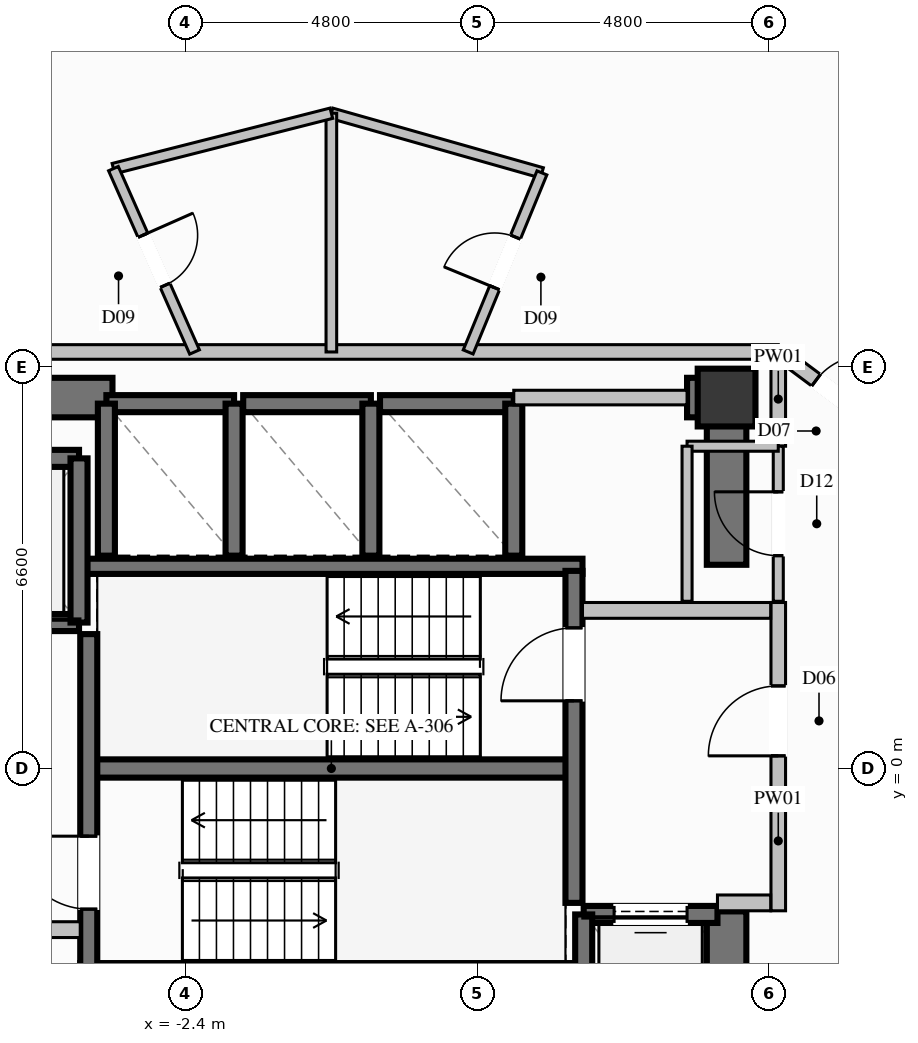
"""IFC4 building model, lengths in metres.
Left out: names, types, materials, properties, quantities, classifications, styles, units other than length and angle.
Written with IfcOpenShell. Run it as: python <this file> out.ifc"""

import sys

from ifc_helpers import new_model, si_unit, direction, frame, frame_2d, origin, origin_2d, place, context, subcontext, project, spatial, rectangle, extrude, element, fill, save


model = new_model("IFC4")
c1 = context("Model", 3, precision=1e-05, world=origin(), true_north=direction((0.0, 1.0)))
c2 = subcontext(c1, "Body", "Model", "MODEL_VIEW")
j1 = project(units=[si_unit("LENGTHUNIT", "METRE"), si_unit("PLANEANGLEUNIT", "RADIAN")], contexts=[c1])
p1 = place(None, origin())
s1 = spatial("IfcSite", under=j1, at=p1, CompositionType="ELEMENT")
p2 = place(p1, origin())
s2 = spatial("IfcBuilding", under=s1, at=p2, CompositionType="ELEMENT")
p3 = place(p2, frame((0.0, 0.0, 106.2)))
s3 = spatial("IfcBuildingStorey", under=s2, at=p3, CompositionType="ELEMENT", Elevation=106.2)
p4 = place(p3, frame((6.5, 6.1, 0.0), z_axis=(0.0, 0.0, 1.0), x_axis=(1.0, 0.0, 0.0)))
e1 = element("IfcColumn", 1, at=p4, inside=s3, PredefinedType="COLUMN", context=c2, shape_type="SweptSolid", body=[
    extrude(rectangle(XDim=0.95, YDim=0.95, at=origin_2d()), origin(), (0.0, 0.0, 1.0), 3.6),
])
p5 = place(p3, frame((-3.99, 0.0, 0.0), z_axis=(0.0, 0.0, 1.0), x_axis=(1.0, 0.0, 0.0)))
e2 = element("IfcWall", 2, at=p5, inside=s3, PredefinedType="SHEAR", context=c2, shape_type="SweptSolid", body=[
    extrude(rectangle(XDim=7.98, YDim=0.3, at=frame_2d((3.99, 0.0))), origin(), (0.0, 0.0, 1.0), 3.6),
])
for number, where, z_axis, x_axis in (
    (3, (-4.13, -3.325, 0.0), (0.0, 0.0, 1.0), (1.0, 0.0, 0.0)),
    (4, (-4.13, 3.325, 0.0), (0.0, 0.0, 1.0), (1.0, 0.0, 0.0)),
):
    element("IfcWall", number, at=place(p3, frame(where, z_axis=z_axis, x_axis=x_axis)), inside=s3, PredefinedType="SOLIDWALL", context=c2, shape_type="SweptSolid", body=[
        extrude(rectangle(XDim=8.26, YDim=0.25, at=frame_2d((4.13, 0.0))), origin(), (0.0, 0.0, 1.0), 3.6),
    ])
p6 = place(p3, frame((-6.175, 6.1, 0.0), z_axis=(0.0, 0.0, 1.0), x_axis=(1.0, 0.0, 0.0)))
e5 = element("IfcWall", 5, at=p6, inside=s3, PredefinedType="SHEAR", context=c2, shape_type="SweptSolid", body=[
    extrude(rectangle(XDim=2.575, YDim=0.65, at=frame_2d((1.288, 0.0))), origin(), (0.0, 0.0, 1.0), 3.6),
])
p7 = place(p3, frame((5.85, 6.1, 0.0), z_axis=(0.0, 0.0, 1.0), x_axis=(1.0, 0.0, 0.0)))
e6 = element("IfcWall", 6, at=p7, inside=s3, PredefinedType="SHEAR", context=c2, shape_type="SweptSolid", body=[
    extrude(rectangle(XDim=0.325, YDim=0.65, at=frame_2d((0.163, 0.0))), origin(), (0.0, 0.0, 1.0), 3.6),
])
p8 = place(p3, frame((6.5, -6.425, 0.0), z_axis=(0.0, 0.0, 1.0), x_axis=(0.0, 1.0, 0.0)))
e7 = element("IfcWall", 7, at=p8, inside=s3, PredefinedType="SHEAR", context=c2, shape_type="SweptSolid", body=[
    extrude(rectangle(XDim=4.075, YDim=0.65, at=frame_2d((2.038, 0.0))), origin(), (0.0, 0.0, 1.0), 3.6),
])
p9 = place(p3, frame((6.5, 3.35, 0.0), z_axis=(0.0, 0.0, 1.0), x_axis=(0.0, 1.0, 0.0)))
e8 = element("IfcWall", 8, at=p9, inside=s3, PredefinedType="SHEAR", context=c2, shape_type="SweptSolid", body=[
    extrude(rectangle(XDim=3.075, YDim=0.65, at=frame_2d((1.538, 0.0))), origin(), (0.0, 0.0, 1.0), 3.6),
])
p10 = place(p3, frame((-1.6, 6.0, 0.0), z_axis=(0.0, 0.0, 1.0), x_axis=(-1.0, 0.0, 0.0)))
e9 = element("IfcWall", 9, at=p10, inside=s3, PredefinedType="SOLIDWALL", context=c2, shape_type="SweptSolid", body=[
    extrude(rectangle(XDim=2.1, YDim=0.28, at=frame_2d((1.05, 0.0))), origin(), (0.0, 0.0, 1.0), 3.35),
])
for number, where, z_axis, x_axis in (
    (10, (-3.7, 6.0, 0.0), (0.0, 0.0, 1.0), (0.0, -1.0, 0.0)),
    (11, (-1.6, 3.5, 0.0), (0.0, 0.0, 1.0), (0.0, 1.0, 0.0)),
):
    element("IfcWall", number, at=place(p3, frame(where, z_axis=z_axis, x_axis=x_axis)), inside=s3, PredefinedType="SOLIDWALL", context=c2, shape_type="SweptSolid", body=[
        extrude(rectangle(XDim=2.5, YDim=0.28, at=frame_2d((1.25, 0.0))), origin(), (0.0, 0.0, 1.0), 3.35),
    ])
p11 = place(p3, frame((0.65, 6.0, 0.0), z_axis=(0.0, 0.0, 1.0), x_axis=(-1.0, 0.0, 0.0)))
e12 = element("IfcWall", 12, at=p11, inside=s3, PredefinedType="SOLIDWALL", context=c2, shape_type="SweptSolid", body=[
    extrude(rectangle(XDim=2.1, YDim=0.28, at=frame_2d((1.05, 0.0))), origin(), (0.0, 0.0, 1.0), 3.35),
])
p12 = place(p3, frame((0.65, 3.5, 0.0), z_axis=(0.0, 0.0, 1.0), x_axis=(0.0, 1.0, 0.0)))
e13 = element("IfcWall", 13, at=p12, inside=s3, PredefinedType="SOLIDWALL", context=c2, shape_type="SweptSolid", body=[
    extrude(rectangle(XDim=2.5, YDim=0.28, at=frame_2d((1.25, 0.0))), origin(), (0.0, 0.0, 1.0), 3.35),
])
p13 = place(p3, frame((3.0, 6.0, 0.0), z_axis=(0.0, 0.0, 1.0), x_axis=(-1.0, 0.0, 0.0)))
e14 = element("IfcWall", 14, at=p13, inside=s3, PredefinedType="SOLIDWALL", context=c2, shape_type="SweptSolid", body=[
    extrude(rectangle(XDim=2.2, YDim=0.28, at=frame_2d((1.1, 0.0))), origin(), (0.0, 0.0, 1.0), 3.35),
])
p14 = place(p3, frame((3.0, 3.5, 0.0), z_axis=(0.0, 0.0, 1.0), x_axis=(0.0, 1.0, 0.0)))
e15 = element("IfcWall", 15, at=p14, inside=s3, PredefinedType="SOLIDWALL", context=c2, shape_type="SweptSolid", body=[
    extrude(rectangle(XDim=2.5, YDim=0.28, at=frame_2d((1.25, 0.0))), origin(), (0.0, 0.0, 1.0), 3.35),
])
p15 = place(p3, frame((-6.35, 2.4, 0.0), z_axis=(0.0, 0.0, 1.0), x_axis=(1.0, 0.0, 0.0)))
e16 = element("IfcWall", 16, at=p15, inside=s3, PredefinedType="SOLIDWALL", context=c2, shape_type="SweptSolid", body=[
    extrude(rectangle(XDim=2.2, YDim=0.28, at=frame_2d((1.1, 0.0))), origin(), (0.0, 0.0, 1.0), 3.35),
])
p16 = place(p15, frame((0.5, 0.0, 0.0)))
e17 = element("IfcOpeningElement", 17, at=p16, cuts=e16, PredefinedType="OPENING", context=c2, shape_type="SweptSolid", body=[
    extrude(rectangle(XDim=1.2, YDim=2.2, at=frame_2d((0.6, 1.1))), frame((0.0, 0.15, 0.0), z_axis=(0.0, -1.0, 0.0), x_axis=(1.0, 0.0, 0.0)), (0.0, 0.0, 1.0), 0.3),
])
p17 = place(p3, frame((-4.15, 5.1, 0.0), z_axis=(0.0, 0.0, 1.0), x_axis=(-1.0, 0.0, 0.0)))
e18 = element("IfcWall", 18, at=p17, inside=s3, PredefinedType="SOLIDWALL", context=c2, shape_type="SweptSolid", body=[
    extrude(rectangle(XDim=2.2, YDim=0.28, at=frame_2d((1.1, 0.0))), origin(), (0.0, 0.0, 1.0), 3.35),
])
p18 = place(p3, frame((-4.15, 2.4, 0.0), z_axis=(0.0, 0.0, 1.0), x_axis=(0.0, 1.0, 0.0)))
e19 = element("IfcWall", 19, at=p18, inside=s3, PredefinedType="SOLIDWALL", context=c2, shape_type="SweptSolid", body=[
    extrude(rectangle(XDim=2.7, YDim=0.28, at=frame_2d((1.35, 0.0))), origin(), (0.0, 0.0, 1.0), 3.35),
])
p19 = place(p3, frame((6.35, -2.4, 0.0), z_axis=(0.0, 0.0, 1.0), x_axis=(-1.0, 0.0, 0.0)))
e20 = element("IfcWall", 20, at=p19, inside=s3, PredefinedType="SOLIDWALL", context=c2, shape_type="SweptSolid", body=[
    extrude(rectangle(XDim=2.2, YDim=0.28, at=frame_2d((1.1, 0.0))), origin(), (0.0, 0.0, 1.0), 3.35),
])
p20 = place(p19, frame((0.5, 0.0, 0.0)))
e21 = element("IfcOpeningElement", 21, at=p20, cuts=e20, PredefinedType="OPENING", context=c2, shape_type="SweptSolid", body=[
    extrude(rectangle(XDim=1.2, YDim=2.2, at=frame_2d((0.6, 1.1))), frame((0.0, 0.15, 0.0), z_axis=(0.0, -1.0, 0.0), x_axis=(1.0, 0.0, 0.0)), (0.0, 0.0, 1.0), 0.3),
])
p21 = place(p3, frame((4.15, -2.4, 0.0), z_axis=(0.0, 0.0, 1.0), x_axis=(0.0, -1.0, 0.0)))
e22 = element("IfcWall", 22, at=p21, inside=s3, PredefinedType="SOLIDWALL", context=c2, shape_type="SweptSolid", body=[
    extrude(rectangle(XDim=2.7, YDim=0.28, at=frame_2d((1.35, 0.0))), origin(), (0.0, 0.0, 1.0), 3.35),
])
p22 = place(p3, frame((-3.99, -3.25, 0.0), z_axis=(0.0, 0.0, 1.0), x_axis=(0.0, 1.0, 0.0)))
e23 = element("IfcWall", 23, at=p22, inside=s3, PredefinedType="SOLIDWALL", context=c2, shape_type="SweptSolid", body=[
    extrude(rectangle(XDim=5.46, YDim=0.28, at=frame_2d((2.73, 0.0))), origin(), (0.0, 0.0, 1.0), 3.35),
])
p23 = place(p22, frame((0.937, 0.0, 0.0)))
e24 = element("IfcOpeningElement", 24, at=p23, cuts=e23, PredefinedType="OPENING", context=c2, shape_type="SweptSolid", body=[
    extrude(rectangle(XDim=1.2, YDim=2.2, at=frame_2d((0.6, 1.1))), frame((0.0, 0.15, 0.0), z_axis=(0.0, -1.0, 0.0), x_axis=(1.0, 0.0, 0.0)), (0.0, 0.0, 1.0), 0.3),
])
p24 = place(p3, frame((3.99, -2.21, 0.0), z_axis=(0.0, 0.0, 1.0), x_axis=(0.0, 1.0, 0.0)))
e25 = element("IfcWall", 25, at=p24, inside=s3, PredefinedType="SOLIDWALL", context=c2, shape_type="SweptSolid", body=[
    extrude(rectangle(XDim=5.46, YDim=0.28, at=frame_2d((2.73, 0.0))), origin(), (0.0, 0.0, 1.0), 3.35),
])
p25 = place(p24, frame((3.323, 0.0, 0.0)))
e26 = element("IfcOpeningElement", 26, at=p25, cuts=e25, PredefinedType="OPENING", context=c2, shape_type="SweptSolid", body=[
    extrude(rectangle(XDim=1.2, YDim=2.2, at=frame_2d((0.6, 1.1))), frame((0.0, 0.15, 0.0), z_axis=(0.0, -1.0, 0.0), x_axis=(1.0, 0.0, 0.0)), (0.0, 0.0, 1.0), 0.3),
])
p26 = place(p3, frame((-7.225, -2.65, 0.0), z_axis=(0.0, 0.0, 1.0), x_axis=(1.0, 0.0, 0.0)))
e27 = element("IfcWall", 27, at=p26, inside=s3, PredefinedType="PARTITIONING", context=c2, shape_type="SweptSolid", body=[
    extrude(rectangle(XDim=3.095, YDim=0.26, at=frame_2d((1.548, 0.0))), origin(), (0.0, 0.0, 1.0), 3.35),
])
p27 = place(p3, frame((7.35, -2.34, 0.0), z_axis=(0.0, 0.0, 1.0), x_axis=(0.0, 1.0, 0.0)))
e28 = element("IfcWall", 28, at=p27, inside=s3, PredefinedType="PARTITIONING", context=c2, shape_type="SweptSolid", body=[
    extrude(rectangle(XDim=5.07, YDim=0.24, at=frame_2d((2.535, 0.0))), origin(), (0.0, 0.0, 1.0), 2.435),
])
p28 = place(p27, frame((2.548, 0.0, 0.0)))
e29 = element("IfcOpeningElement", 29, at=p28, cuts=e28, PredefinedType="OPENING", context=c2, shape_type="SweptSolid", body=[
    extrude(rectangle(XDim=1.15, YDim=2.2, at=frame_2d((0.575, 1.1))), frame((0.0, 0.13, 0.0), z_axis=(0.0, -1.0, 0.0), x_axis=(1.0, 0.0, 0.0)), (0.0, 0.0, 1.0), 0.26),
])
p29 = place(p3, frame((6.35, -2.21, 0.0), z_axis=(0.0, 0.0, 1.0), x_axis=(1.0, 0.0, 0.0)))
e30 = element("IfcWall", 30, at=p29, inside=s3, PredefinedType="PARTITIONING", context=c2, shape_type="SweptSolid", body=[
    extrude(rectangle(XDim=0.875, YDim=0.26, at=frame_2d((0.438, 0.0))), origin(), (0.0, 0.0, 1.0), 3.35),
])
p30 = place(p3, frame((4.13, 2.6, 0.0), z_axis=(0.0, 0.0, 1.0), x_axis=(1.0, 0.0, 0.0)))
e31 = element("IfcWall", 31, at=p30, inside=s3, PredefinedType="PARTITIONING", context=c2, shape_type="SweptSolid", body=[
    extrude(rectangle(XDim=3.095, YDim=0.26, at=frame_2d((1.548, 0.0))), origin(), (0.0, 0.0, 1.0), 3.35),
])
p31 = place(p3, frame((-7.35, 6.85, 0.0), z_axis=(0.0, 0.0, 1.0), x_axis=(1.0, 0.0, 0.0)))
e32 = element("IfcWall", 32, at=p31, inside=s3, PredefinedType="PARTITIONING", context=c2, shape_type="SweptSolid", body=[
    extrude(rectangle(XDim=14.7, YDim=0.24, at=frame_2d((7.35, 0.0))), origin(), (0.0, 0.0, 1.0), 2.435),
])
p32 = place(p3, frame((7.35, 5.3, 0.0), z_axis=(0.0, 0.0, 1.0), x_axis=(0.0, 1.0, 0.0)))
e33 = element("IfcWall", 33, at=p32, inside=s3, PredefinedType="PARTITIONING", context=c2, shape_type="SweptSolid", body=[
    extrude(rectangle(XDim=1.55, YDim=0.24, at=frame_2d((0.775, 0.0))), origin(), (0.0, 0.0, 1.0), 2.435),
])
p33 = place(p3, frame((3.0, 6.1, 0.0), z_axis=(0.0, 0.0, 1.0), x_axis=(1.0, 0.0, 0.0)))
e34 = element("IfcWall", 34, at=p33, inside=s3, PredefinedType="PARTITIONING", context=c2, shape_type="SweptSolid", body=[
    extrude(rectangle(XDim=2.85, YDim=0.24, at=frame_2d((1.425, 0.0))), origin(), (0.0, 0.0, 1.0), 2.435),
])
p34 = place(p3, frame((7.35, 2.75, 0.0), z_axis=(0.0, 0.0, 1.0), x_axis=(0.0, 1.0, 0.0)))
e35 = element("IfcWall", 35, at=p34, inside=s3, PredefinedType="PARTITIONING", context=c2, shape_type="SweptSolid", body=[
    extrude(rectangle(XDim=2.55, YDim=0.165, at=frame_2d((1.275, 0.0))), origin(), (0.0, 0.0, 1.0), 3.35),
])
p35 = place(p34, frame((0.75, 0.0, 0.0)))
e36 = element("IfcOpeningElement", 36, at=p35, cuts=e35, PredefinedType="OPENING", context=c2, shape_type="SweptSolid", body=[
    extrude(rectangle(XDim=1.05, YDim=2.15, at=frame_2d((0.525, 1.075))), frame((0.0, 0.093, 0.0), z_axis=(0.0, -1.0, 0.0), x_axis=(1.0, 0.0, 0.0)), (0.0, 0.0, 1.0), 0.185),
])
p36 = place(p3, frame((7.35, 5.3, 0.0), z_axis=(0.0, 0.0, 1.0), x_axis=(-1.0, 0.0, 0.0)))
e37 = element("IfcWall", 37, at=p36, inside=s3, PredefinedType="PARTITIONING", context=c2, shape_type="SweptSolid", body=[
    extrude(rectangle(XDim=1.5, YDim=0.165, at=frame_2d((0.75, 0.0))), origin(), (0.0, 0.0, 1.0), 2.435),
])
p37 = place(p3, frame((5.85, 5.3, 0.0), z_axis=(0.0, 0.0, 1.0), x_axis=(0.0, -1.0, 0.0)))
e38 = element("IfcWall", 38, at=p37, inside=s3, PredefinedType="PARTITIONING", context=c2, shape_type="SweptSolid", body=[
    extrude(rectangle(XDim=2.55, YDim=0.165, at=frame_2d((1.275, 0.0))), origin(), (0.0, 0.0, 1.0), 2.435),
])
p38 = place(p3, frame((0.0, 10.776, 0.0), z_axis=(0.0, 0.0, 1.0), x_axis=(0.962140957865, -0.272552338459, 0.0)))
e39 = element("IfcWall", 39, at=p38, inside=s3, PredefinedType="PLUMBINGWALL", context=c2, shape_type="SweptSolid", body=[
    extrude(rectangle(XDim=3.599, YDim=0.175, at=frame_2d((1.8, 0.0))), origin(), (0.0, 0.0, 1.0), 2.985),
])
p39 = place(p3, frame((0.0, 10.776, 0.0), z_axis=(0.0, 0.0, 1.0), x_axis=(0.0, -1.0, 0.0)))
e40 = element("IfcWall", 40, at=p39, inside=s3, PredefinedType="PLUMBINGWALL", context=c2, shape_type="SweptSolid", body=[
    extrude(rectangle(XDim=3.926, YDim=0.175, at=frame_2d((1.963, 0.0))), origin(), (0.0, 0.0, 1.0), 3.35),
])
p40 = place(p3, frame((2.25, 6.85, 0.0), z_axis=(0.0, 0.0, 1.0), x_axis=(0.380834625893, 0.924643167779, 0.0)))
e41 = element("IfcWall", 41, at=p40, inside=s3, PredefinedType="PLUMBINGWALL", context=c2, shape_type="SweptSolid", body=[
    extrude(rectangle(XDim=3.185, YDim=0.175, at=frame_2d((1.592, 0.0))), origin(), (0.0, 0.0, 1.0), 3.35),
])
p41 = place(p40, frame((1.143, 0.0, 0.0)))
e42 = element("IfcOpeningElement", 42, at=p41, cuts=e41, PredefinedType="OPENING", context=c2, shape_type="SweptSolid", body=[
    extrude(rectangle(XDim=0.9, YDim=2.1, at=frame_2d((0.45, 1.05))), frame((0.0, 0.098, 0.0), z_axis=(0.0, -1.0, 0.0), x_axis=(1.0, 0.0, 0.0)), (0.0, 0.0, 1.0), 0.195),
])
p42 = place(p3, frame((7.35, 6.85, 0.0), z_axis=(0.0, 0.0, 1.0), x_axis=(0.8017416961, -0.597670689205, 0.0)))
e43 = element("IfcWall", 43, at=p42, inside=s3, PredefinedType="PARTITIONING", context=c2, shape_type="SweptSolid", body=[
    extrude(rectangle(XDim=2.552, YDim=0.24, at=frame_2d((1.276, 0.0))), origin(), (0.0, 0.0, 1.0), 3.35),
])
p43 = place(p42, frame((0.776, 0.0, 0.0)))
e44 = element("IfcOpeningElement", 44, at=p43, cuts=e43, PredefinedType="OPENING", context=c2, shape_type="SweptSolid", body=[
    extrude(rectangle(XDim=1.0, YDim=2.2, at=frame_2d((0.5, 1.1))), frame((0.0, 0.13, 0.0), z_axis=(0.0, -1.0, 0.0), x_axis=(1.0, 0.0, 0.0)), (0.0, 0.0, 1.0), 0.26),
])
p44 = place(p3, frame((-3.584, 9.865, 0.0), z_axis=(0.0, 0.0, 1.0), x_axis=(0.969187500781, 0.246324152957, 0.0)))
e45 = element("IfcWall", 45, at=p44, inside=s3, PredefinedType="PLUMBINGWALL", context=c2, shape_type="SweptSolid", body=[
    extrude(rectangle(XDim=3.698, YDim=0.175, at=frame_2d((1.849, 0.0))), origin(), (0.0, 0.0, 1.0), 2.985),
])
p45 = place(p3, frame((-3.584, 9.865, 0.0), z_axis=(0.0, 0.0, 1.0), x_axis=(0.404626310395, -0.914482120621, 0.0)))
e46 = element("IfcWall", 46, at=p45, inside=s3, PredefinedType="PLUMBINGWALL", context=c2, shape_type="SweptSolid", body=[
    extrude(rectangle(XDim=3.297, YDim=0.175, at=frame_2d((1.648, 0.0))), origin(), (0.0, 0.0, 1.0), 3.35),
])
p46 = place(p45, frame((1.198, 0.0, 0.0)))
e47 = element("IfcOpeningElement", 47, at=p46, cuts=e46, PredefinedType="OPENING", context=c2, shape_type="SweptSolid", body=[
    extrude(rectangle(XDim=0.9, YDim=2.1, at=frame_2d((0.45, 1.05))), frame((0.0, 0.098, 0.0), z_axis=(0.0, -1.0, 0.0), x_axis=(1.0, 0.0, 0.0)), (0.0, 0.0, 1.0), 0.195),
])
p47 = place(p20, origin())
e48 = element("IfcDoor", 48, at=p47, inside=s3, OperationType="SLIDING_TO_LEFT", PredefinedType="DOOR", context=c2, shape_type="SweptSolid", body=[
    extrude(rectangle(XDim=1.2, YDim=2.2, at=frame_2d((0.6, 1.1))), frame((0.0, 0.025, 0.0), z_axis=(0.0, -1.0, 0.0), x_axis=(1.0, 0.0, 0.0)), (0.0, 0.0, 1.0), 0.05),
])
fill(e21, e48)
p48 = place(p23, origin())
e49 = element("IfcDoor", 49, at=p48, inside=s3, OperationType="SINGLE_SWING_RIGHT", PredefinedType="DOOR", context=c2, shape_type="SweptSolid", body=[
    extrude(rectangle(XDim=1.2, YDim=2.2, at=frame_2d((0.6, 1.1))), frame((0.0, 0.025, 0.0), z_axis=(0.0, -1.0, 0.0), x_axis=(1.0, 0.0, 0.0)), (0.0, 0.0, 1.0), 0.05),
])
fill(e24, e49)
p49 = place(p25, origin())
e50 = element("IfcDoor", 50, at=p49, inside=s3, OperationType="SINGLE_SWING_LEFT", PredefinedType="DOOR", context=c2, shape_type="SweptSolid", body=[
    extrude(rectangle(XDim=1.2, YDim=2.2, at=frame_2d((0.6, 1.1))), frame((0.0, 0.025, 0.0), z_axis=(0.0, -1.0, 0.0), x_axis=(1.0, 0.0, 0.0)), (0.0, 0.0, 1.0), 0.05),
])
fill(e26, e50)
p50 = place(p28, origin())
e51 = element("IfcDoor", 51, at=p50, inside=s3, OperationType="SINGLE_SWING_LEFT", PredefinedType="DOOR", context=c2, shape_type="SweptSolid", body=[
    extrude(rectangle(XDim=1.15, YDim=2.2, at=frame_2d((0.575, 1.1))), frame((0.0, 0.025, 0.0), z_axis=(0.0, -1.0, 0.0), x_axis=(1.0, 0.0, 0.0)), (0.0, 0.0, 1.0), 0.05),
])
fill(e29, e51)
p51 = place(p35, origin())
e52 = element("IfcDoor", 52, at=p51, inside=s3, OperationType="SINGLE_SWING_RIGHT", PredefinedType="DOOR", context=c2, shape_type="SweptSolid", body=[
    extrude(rectangle(XDim=1.05, YDim=2.15, at=frame_2d((0.525, 1.075))), frame((0.0, 0.025, 0.0), z_axis=(0.0, -1.0, 0.0), x_axis=(1.0, 0.0, 0.0)), (0.0, 0.0, 1.0), 0.05),
])
fill(e36, e52)
p52 = place(p41, origin())
e53 = element("IfcDoor", 53, at=p52, inside=s3, OperationType="SINGLE_SWING_LEFT", PredefinedType="DOOR", context=c2, shape_type="SweptSolid", body=[
    extrude(rectangle(XDim=0.9, YDim=2.1, at=frame_2d((0.45, 1.05))), frame((0.0, 0.025, 0.0), z_axis=(0.0, -1.0, 0.0), x_axis=(1.0, 0.0, 0.0)), (0.0, 0.0, 1.0), 0.05),
])
fill(e42, e53)
p53 = place(p43, origin())
e54 = element("IfcDoor", 54, at=p53, inside=s3, OperationType="SINGLE_SWING_RIGHT", PredefinedType="DOOR", context=c2, shape_type="SweptSolid", body=[
    extrude(rectangle(XDim=1.0, YDim=2.2, at=frame_2d((0.5, 1.1))), frame((0.0, 0.025, 0.0), z_axis=(0.0, -1.0, 0.0), x_axis=(1.0, 0.0, 0.0)), (0.0, 0.0, 1.0), 0.05),
])
fill(e44, e54)
p54 = place(p46, origin())
e55 = element("IfcDoor", 55, at=p54, inside=s3, OperationType="SINGLE_SWING_LEFT", PredefinedType="DOOR", context=c2, shape_type="SweptSolid", body=[
    extrude(rectangle(XDim=0.9, YDim=2.1, at=frame_2d((0.45, 1.05))), frame((0.0, 0.025, 0.0), z_axis=(0.0, -1.0, 0.0), x_axis=(1.0, 0.0, 0.0)), (0.0, 0.0, 1.0), 0.05),
])
fill(e47, e55)
save(model, sys.argv[1])
